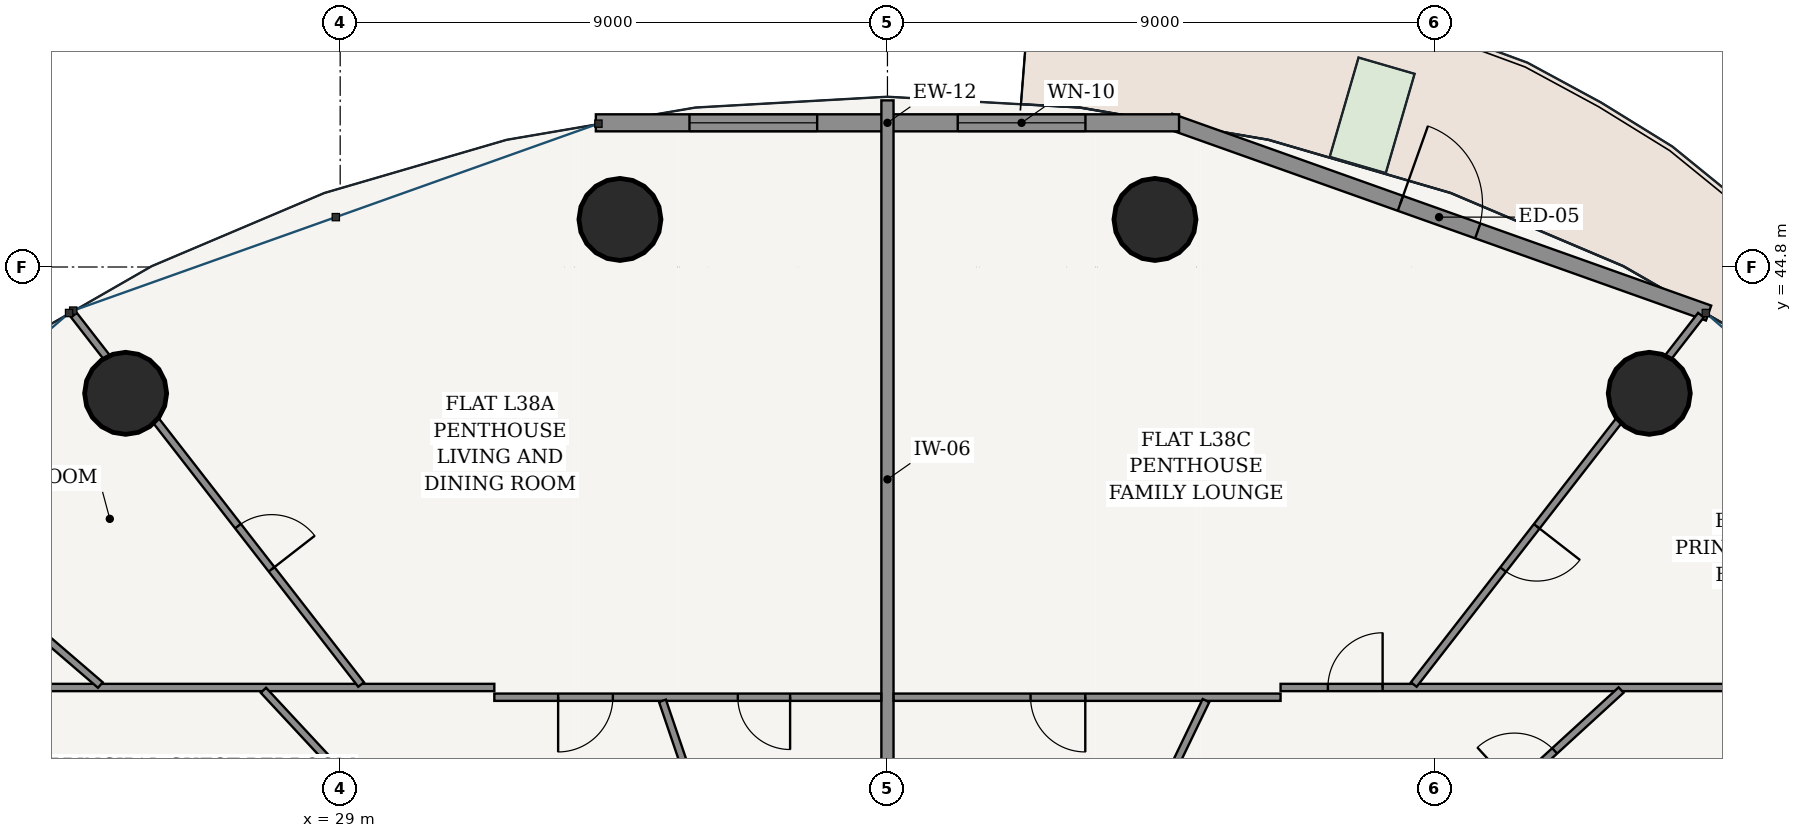
"""IFC4 building model, lengths in metres.
Left out: names, types, materials, properties, quantities, classifications, styles, units other than length and angle.
Written with IfcOpenShell. Run it as: python <this file> out.ifc"""

import sys

from ifc_helpers import new_model, si_unit, direction, frame, frame_2d, origin, origin_2d, place, context, subcontext, project, spatial, rectangle, hollow_circle, extrude, source, transform, mapped, element, fill, save


model = new_model("IFC4")
c1 = context("Model", 3, precision=1e-05, world=origin(), true_north=direction((-0.2419218956, 0.970295726276)))
c2 = subcontext(c1, "Body", "Model", "MODEL_VIEW")
j1 = project(units=[si_unit("LENGTHUNIT", "METRE"), si_unit("PLANEANGLEUNIT", "RADIAN")], contexts=[c1])
p1 = place(None, origin())
s1 = spatial("IfcSite", under=j1, at=p1, CompositionType="ELEMENT")
p2 = place(p1, origin())
s2 = spatial("IfcBuilding", under=s1, at=p2, CompositionType="ELEMENT")
p3 = place(p2, frame((0.0, 0.0, 146.2)))
s3 = spatial("IfcBuildingStorey", under=s2, at=p3, CompositionType="ELEMENT", Elevation=146.2)
for number, where, z_axis, x_axis in (
    (1, (50.528, 42.723, 0.0), (0.0, 0.0, 1.0), (1.0, 0.0, 0.0)),
    (2, (42.399, 45.582, 0.0), (0.0, 0.0, 1.0), (1.0, 0.0, 0.0)),
    (3, (33.601, 45.582, 0.0), (0.0, 0.0, 1.0), (1.0, 0.0, 0.0)),
    (4, (25.472, 42.723, 0.0), (0.0, 0.0, 1.0), (1.0, 0.0, 0.0)),
):
    element("IfcColumn", number, at=place(p3, frame(where, z_axis=z_axis, x_axis=x_axis)), inside=s3, PredefinedType="COLUMN", context=c2, shape_type="SweptSolid", body=[
        extrude(hollow_circle(Radius=0.675, WallThickness=0.042, at=origin_2d()), origin(), (0.0, 0.0, 1.0), 3.6),
    ])
p4 = place(p3, frame((51.503, 44.043, 0.0), z_axis=(0.0, 0.0, 1.0), x_axis=(-0.942095406405, 0.335344964522, 0.0)))
e5 = element("IfcWall", 5, at=p4, inside=s3, PredefinedType="SOLIDWALL", context=c2, shape_type="SweptSolid", body=[
    extrude(rectangle(XDim=9.408, YDim=0.26, at=frame_2d((4.704, 0.0))), origin(), (0.0, 0.0, 1.0), 3.33),
])
p5 = place(p4, frame((4.029, 0.0, 0.0)))
e6 = element("IfcOpeningElement", 6, at=p5, cuts=e5, PredefinedType="OPENING", context=c2, shape_type="SweptSolid", body=[
    extrude(rectangle(XDim=1.35, YDim=2.2, at=frame_2d((0.675, 1.1))), frame((0.0, 0.14, 0.0), z_axis=(0.0, -1.0, 0.0), x_axis=(1.0, 0.0, 0.0)), (0.0, 0.0, 1.0), 0.28),
])
p6 = place(p3, frame((42.795, 47.171, 0.0), z_axis=(0.0, 0.0, 1.0), x_axis=(-1.0, 0.0, 0.0)))
e7 = element("IfcWall", 7, at=p6, inside=s3, PredefinedType="SOLIDWALL", context=c2, shape_type="SweptSolid", body=[
    extrude(rectangle(XDim=9.591, YDim=0.28, at=frame_2d((4.795, 0.0))), origin(), (0.0, 0.0, 1.0), 3.33),
])
p7 = place(p6, frame((1.54, 0.0, 0.85)))
e8 = element("IfcOpeningElement", 8, at=p7, cuts=e7, PredefinedType="OPENING", context=c2, shape_type="SweptSolid", body=[
    extrude(rectangle(XDim=2.1, YDim=1.95, at=frame_2d((1.05, 0.975))), frame((0.0, 0.15, 0.0), z_axis=(0.0, -1.0, 0.0), x_axis=(1.0, 0.0, 0.0)), (0.0, 0.0, 1.0), 0.3),
])
p8 = place(p6, frame((5.951, 0.0, 0.85)))
e9 = element("IfcOpeningElement", 9, at=p8, cuts=e7, PredefinedType="OPENING", context=c2, shape_type="SweptSolid", body=[
    extrude(rectangle(XDim=2.1, YDim=1.95, at=frame_2d((1.05, 0.975))), frame((0.0, 0.15, 0.0), z_axis=(0.0, -1.0, 0.0), x_axis=(1.0, 0.0, 0.0)), (0.0, 0.0, 1.0), 0.3),
])
p9 = place(p3, frame((38.0, 35.075, 0.0), z_axis=(0.0, 0.0, 1.0), x_axis=(0.0, 1.0, 0.0)))
e10 = element("IfcWall", 10, at=p9, inside=s3, PredefinedType="PARTITIONING", context=c2, shape_type="SweptSolid", body=[
    extrude(rectangle(XDim=12.465, YDim=0.2, at=frame_2d((6.232, 0.0))), origin(), (0.0, 0.0, 1.0), 2.415),
])
p10 = place(p3, frame((24.065, 37.885, 0.0), z_axis=(0.0, 0.0, 1.0), x_axis=(1.0, 0.0, 0.0)))
e11 = element("IfcWall", 11, at=p10, inside=s3, PredefinedType="PARTITIONING", context=c2, shape_type="SweptSolid", body=[
    extrude(rectangle(XDim=7.47, YDim=0.12, at=frame_2d((3.735, 0.0))), origin(), (0.0, 0.0, 1.0), 2.776),
])
p11 = place(p3, frame((31.535, 37.725, 0.0), z_axis=(0.0, 0.0, 1.0), x_axis=(1.0, 0.0, 0.0)))
e12 = element("IfcWall", 12, at=p11, inside=s3, PredefinedType="PARTITIONING", context=c2, shape_type="SweptSolid", body=[
    extrude(rectangle(XDim=6.363, YDim=0.12, at=frame_2d((3.182, 0.0))), origin(), (0.0, 0.0, 1.0), 2.776),
])
p12 = place(p11, frame((4.004, 0.0, 0.0)))
e13 = element("IfcOpeningElement", 13, at=p12, cuts=e12, PredefinedType="OPENING", context=c2, shape_type="SweptSolid", body=[
    extrude(rectangle(XDim=0.86, YDim=2.15, at=frame_2d((0.43, 1.075))), frame((0.0, 0.07, 0.0), z_axis=(0.0, -1.0, 0.0), x_axis=(1.0, 0.0, 0.0)), (0.0, 0.0, 1.0), 0.14),
])
p13 = place(p11, frame((1.049, 0.0, 0.0)))
e14 = element("IfcOpeningElement", 14, at=p13, cuts=e12, PredefinedType="OPENING", context=c2, shape_type="SweptSolid", body=[
    extrude(rectangle(XDim=0.9, YDim=2.15, at=frame_2d((0.45, 1.075))), frame((0.0, 0.07, 0.0), z_axis=(0.0, -1.0, 0.0), x_axis=(1.0, 0.0, 0.0)), (0.0, 0.0, 1.0), 0.14),
])
p14 = place(p3, frame((29.344, 37.934, 0.0), z_axis=(0.0, 0.0, 1.0), x_axis=(-0.613758289074, 0.789493991487, 0.0)))
e15 = element("IfcWall", 15, at=p14, inside=s3, PredefinedType="PARTITIONING", context=c2, shape_type="SweptSolid", body=[
    extrude(rectangle(XDim=7.695, YDim=0.12, at=frame_2d((3.848, 0.0))), origin(), (0.0, 0.0, 1.0), 2.776),
])
p15 = place(p14, frame((2.399, 0.0, 0.0)))
e16 = element("IfcOpeningElement", 16, at=p15, cuts=e15, PredefinedType="OPENING", context=c2, shape_type="SweptSolid", body=[
    extrude(rectangle(XDim=0.9, YDim=2.15, at=frame_2d((0.45, 1.075))), frame((0.0, 0.07, 0.0), z_axis=(0.0, -1.0, 0.0), x_axis=(1.0, 0.0, 0.0)), (0.0, 0.0, 1.0), 0.14),
])
p16 = place(p3, frame((25.056, 37.925, 0.0), z_axis=(0.0, 0.0, 1.0), x_axis=(-0.758354915574, 0.65184186888, 0.0)))
e17 = element("IfcWall", 17, at=p16, inside=s3, PredefinedType="PARTITIONING", context=c2, shape_type="SweptSolid", body=[
    extrude(rectangle(XDim=5.432, YDim=0.12, at=frame_2d((2.716, 0.0))), origin(), (0.0, 0.0, 1.0), 2.846),
])
p17 = place(p16, frame((2.266, 0.0, 0.0)))
e18 = element("IfcOpeningElement", 18, at=p17, cuts=e17, PredefinedType="OPENING", context=c2, shape_type="SweptSolid", body=[
    extrude(rectangle(XDim=0.9, YDim=2.15, at=frame_2d((0.45, 1.075))), frame((0.0, 0.07, 0.0), z_axis=(0.0, -1.0, 0.0), x_axis=(1.0, 0.0, 0.0)), (0.0, 0.0, 1.0), 0.14),
])
p18 = place(p3, frame((35.182, 35.075, 0.0), z_axis=(0.0, 0.0, 1.0), x_axis=(-0.322321614946, 0.946630221649, 0.0)))
e19 = element("IfcWall", 19, at=p18, inside=s3, PredefinedType="PARTITIONING", context=c2, shape_type="SweptSolid", body=[
    extrude(rectangle(XDim=2.737, YDim=0.12, at=frame_2d((1.369, 0.0))), origin(), (0.0, 0.0, 1.0), 2.415),
])
p19 = place(p3, frame((30.307, 35.075, 0.0), z_axis=(0.0, 0.0, 1.0), x_axis=(-0.68082810609, 0.732443233267, 0.0)))
e20 = element("IfcWall", 20, at=p19, inside=s3, PredefinedType="PARTITIONING", context=c2, shape_type="SweptSolid", body=[
    extrude(rectangle(XDim=3.775, YDim=0.12, at=frame_2d((1.887, 0.0))), origin(), (0.0, 0.0, 1.0), 2.776),
])
p20 = place(p3, frame((38.102, 37.725, 0.0), z_axis=(0.0, 0.0, 1.0), x_axis=(1.0, 0.0, 0.0)))
e21 = element("IfcWall", 21, at=p20, inside=s3, PredefinedType="PARTITIONING", context=c2, shape_type="SweptSolid", body=[
    extrude(rectangle(XDim=6.363, YDim=0.12, at=frame_2d((3.182, 0.0))), origin(), (0.0, 0.0, 1.0), 2.776),
])
p21 = place(p20, frame((2.251, 0.0, 0.0)))
e22 = element("IfcOpeningElement", 22, at=p21, cuts=e21, PredefinedType="OPENING", context=c2, shape_type="SweptSolid", body=[
    extrude(rectangle(XDim=0.9, YDim=2.15, at=frame_2d((0.45, 1.075))), frame((0.0, 0.07, 0.0), z_axis=(0.0, -1.0, 0.0), x_axis=(1.0, 0.0, 0.0)), (0.0, 0.0, 1.0), 0.14),
])
p22 = place(p3, frame((44.465, 37.885, 0.0), z_axis=(0.0, 0.0, 1.0), x_axis=(1.0, 0.0, 0.0)))
e23 = element("IfcWall", 23, at=p22, inside=s3, PredefinedType="PARTITIONING", context=c2, shape_type="SweptSolid", body=[
    extrude(rectangle(XDim=7.47, YDim=0.12, at=frame_2d((3.735, 0.0))), origin(), (0.0, 0.0, 1.0), 2.776),
])
p23 = place(p22, frame((0.778, 0.0, 0.0)))
e24 = element("IfcOpeningElement", 24, at=p23, cuts=e23, PredefinedType="OPENING", context=c2, shape_type="SweptSolid", body=[
    extrude(rectangle(XDim=0.9, YDim=2.15, at=frame_2d((0.45, 1.075))), frame((0.0, 0.07, 0.0), z_axis=(0.0, -1.0, 0.0), x_axis=(1.0, 0.0, 0.0)), (0.0, 0.0, 1.0), 0.14),
])
p24 = place(p3, frame((46.656, 37.934, 0.0), z_axis=(0.0, 0.0, 1.0), x_axis=(0.613758289074, 0.789493991487, 0.0)))
e25 = element("IfcWall", 25, at=p24, inside=s3, PredefinedType="PARTITIONING", context=c2, shape_type="SweptSolid", body=[
    extrude(rectangle(XDim=7.695, YDim=0.12, at=frame_2d((3.848, 0.0))), origin(), (0.0, 0.0, 1.0), 2.776),
])
p25 = place(p24, frame((2.395, 0.0, 0.0)))
e26 = element("IfcOpeningElement", 26, at=p25, cuts=e25, PredefinedType="OPENING", context=c2, shape_type="SweptSolid", body=[
    extrude(rectangle(XDim=0.9, YDim=2.15, at=frame_2d((0.45, 1.075))), frame((0.0, 0.07, 0.0), z_axis=(0.0, -1.0, 0.0), x_axis=(1.0, 0.0, 0.0)), (0.0, 0.0, 1.0), 0.14),
])
p26 = place(p3, frame((47.216, 35.235, 0.0), z_axis=(0.0, 0.0, 1.0), x_axis=(0.73766811085, 0.675163504816, 0.0)))
e27 = element("IfcWall", 27, at=p26, inside=s3, PredefinedType="PARTITIONING", context=c2, shape_type="SweptSolid", body=[
    extrude(rectangle(XDim=3.863, YDim=0.12, at=frame_2d((1.932, 0.0))), origin(), (0.0, 0.0, 1.0), 2.776),
])
p27 = place(p26, frame((1.481, 0.0, 0.0)))
e28 = element("IfcOpeningElement", 28, at=p27, cuts=e27, PredefinedType="OPENING", context=c2, shape_type="SweptSolid", body=[
    extrude(rectangle(XDim=0.9, YDim=2.15, at=frame_2d((0.45, 1.075))), frame((0.0, 0.07, 0.0), z_axis=(0.0, -1.0, 0.0), x_axis=(1.0, 0.0, 0.0)), (0.0, 0.0, 1.0), 0.14),
])
p28 = place(p3, frame((41.988, 35.075, 0.0), z_axis=(0.0, 0.0, 1.0), x_axis=(0.434144408634, 0.900843289619, 0.0)))
e29 = element("IfcWall", 29, at=p28, inside=s3, PredefinedType="PARTITIONING", context=c2, shape_type="SweptSolid", body=[
    extrude(rectangle(XDim=2.88, YDim=0.12, at=frame_2d((1.44, 0.0))), origin(), (0.0, 0.0, 1.0), 3.33),
])
m1 = source(origin(), c2, "Body", "SweptSolid", [
    extrude(rectangle(XDim=1.35, YDim=2.2, at=frame_2d((0.675, 1.1))), frame((0.0, 0.025, 0.0), z_axis=(0.0, -1.0, 0.0), x_axis=(1.0, 0.0, 0.0)), (0.0, 0.0, 1.0), 0.05),
])
p29 = place(p5, frame((1.35, 0.0, 0.0), z_axis=(0.0, 0.0, 1.0), x_axis=(-1.0, 0.0, 0.0)))
e30 = element("IfcDoor", 30, at=p29, inside=s3, OperationType="SINGLE_SWING_LEFT", PredefinedType="DOOR", context=c2, shape_type="MappedRepresentation", body=[
    mapped(m1, transform((0.0, 0.0, 0.0), scale=1.0)),
])
fill(e6, e30)
m2 = source(origin(), c2, "Body", "SweptSolid", [
    extrude(rectangle(XDim=2.1, YDim=1.95, at=frame_2d((1.05, 0.975))), frame((0.0, 0.03, 0.0), z_axis=(0.0, -1.0, 0.0), x_axis=(1.0, 0.0, 0.0)), (0.0, 0.0, 1.0), 0.06),
])
p30 = place(p7, origin())
e31 = element("IfcWindow", 31, at=p30, inside=s3, PartitioningType="SINGLE_PANEL", PredefinedType="WINDOW", context=c2, shape_type="MappedRepresentation", body=[
    mapped(m2, transform((0.0, 0.0, 0.0), scale=1.0)),
])
fill(e8, e31)
p31 = place(p8, origin())
e32 = element("IfcWindow", 32, at=p31, inside=s3, PartitioningType="SINGLE_PANEL", PredefinedType="WINDOW", context=c2, shape_type="MappedRepresentation", body=[
    mapped(m2, transform((0.0, 0.0, 0.0), scale=1.0)),
])
fill(e9, e32)
m3 = source(origin(), c2, "Body", "SweptSolid", [
    extrude(rectangle(XDim=0.9, YDim=2.15, at=frame_2d((0.45, 1.075))), frame((0.0, 0.025, 0.0), z_axis=(0.0, -1.0, 0.0), x_axis=(1.0, 0.0, 0.0)), (0.0, 0.0, 1.0), 0.05),
])
p32 = place(p15, frame((0.9, 0.0, 0.0), z_axis=(0.0, 0.0, 1.0), x_axis=(-1.0, 0.0, 0.0)))
e33 = element("IfcDoor", 33, at=p32, inside=s3, OperationType="SINGLE_SWING_RIGHT", PredefinedType="DOOR", context=c2, shape_type="MappedRepresentation", body=[
    mapped(m3, transform((0.0, 0.0, 0.0), scale=1.0)),
])
fill(e16, e33)
m4 = source(origin(), c2, "Body", "SweptSolid", [
    extrude(rectangle(XDim=0.86, YDim=2.15, at=frame_2d((0.43, 1.075))), frame((0.0, 0.025, 0.0), z_axis=(0.0, -1.0, 0.0), x_axis=(1.0, 0.0, 0.0)), (0.0, 0.0, 1.0), 0.05),
])
p33 = place(p12, frame((0.86, 0.0, 0.0), z_axis=(0.0, 0.0, 1.0), x_axis=(-1.0, 0.0, 0.0)))
e34 = element("IfcDoor", 34, at=p33, inside=s3, OperationType="SINGLE_SWING_LEFT", PredefinedType="DOOR", context=c2, shape_type="MappedRepresentation", body=[
    mapped(m4, transform((0.0, 0.0, 0.0), scale=1.0)),
])
fill(e13, e34)
p34 = place(p13, frame((0.9, 0.0, 0.0), z_axis=(0.0, 0.0, 1.0), x_axis=(-1.0, 0.0, 0.0)))
e35 = element("IfcDoor", 35, at=p34, inside=s3, OperationType="SINGLE_SWING_RIGHT", PredefinedType="DOOR", context=c2, shape_type="MappedRepresentation", body=[
    mapped(m3, transform((0.0, 0.0, 0.0), scale=1.0)),
])
fill(e14, e35)
p35 = place(p27, origin())
e36 = element("IfcDoor", 36, at=p35, inside=s3, OperationType="SINGLE_SWING_LEFT", PredefinedType="DOOR", context=c2, shape_type="MappedRepresentation", body=[
    mapped(m3, transform((0.0, 0.0, 0.0), scale=1.0)),
])
fill(e28, e36)
p36 = place(p23, origin())
e37 = element("IfcDoor", 37, at=p36, inside=s3, OperationType="SINGLE_SWING_RIGHT", PredefinedType="DOOR", context=c2, shape_type="MappedRepresentation", body=[
    mapped(m3, transform((0.0, 0.0, 0.0), scale=1.0)),
])
fill(e24, e37)
p37 = place(p21, frame((0.9, 0.0, 0.0), z_axis=(0.0, 0.0, 1.0), x_axis=(-1.0, 0.0, 0.0)))
e38 = element("IfcDoor", 38, at=p37, inside=s3, OperationType="SINGLE_SWING_LEFT", PredefinedType="DOOR", context=c2, shape_type="MappedRepresentation", body=[
    mapped(m3, transform((0.0, 0.0, 0.0), scale=1.0)),
])
fill(e22, e38)
p38 = place(p25, frame((0.9, 0.0, 0.0), z_axis=(0.0, 0.0, 1.0), x_axis=(-1.0, 0.0, 0.0)))
e39 = element("IfcDoor", 39, at=p38, inside=s3, OperationType="SINGLE_SWING_LEFT", PredefinedType="DOOR", context=c2, shape_type="MappedRepresentation", body=[
    mapped(m3, transform((0.0, 0.0, 0.0), scale=1.0)),
])
fill(e26, e39)
save(model, sys.argv[1])
